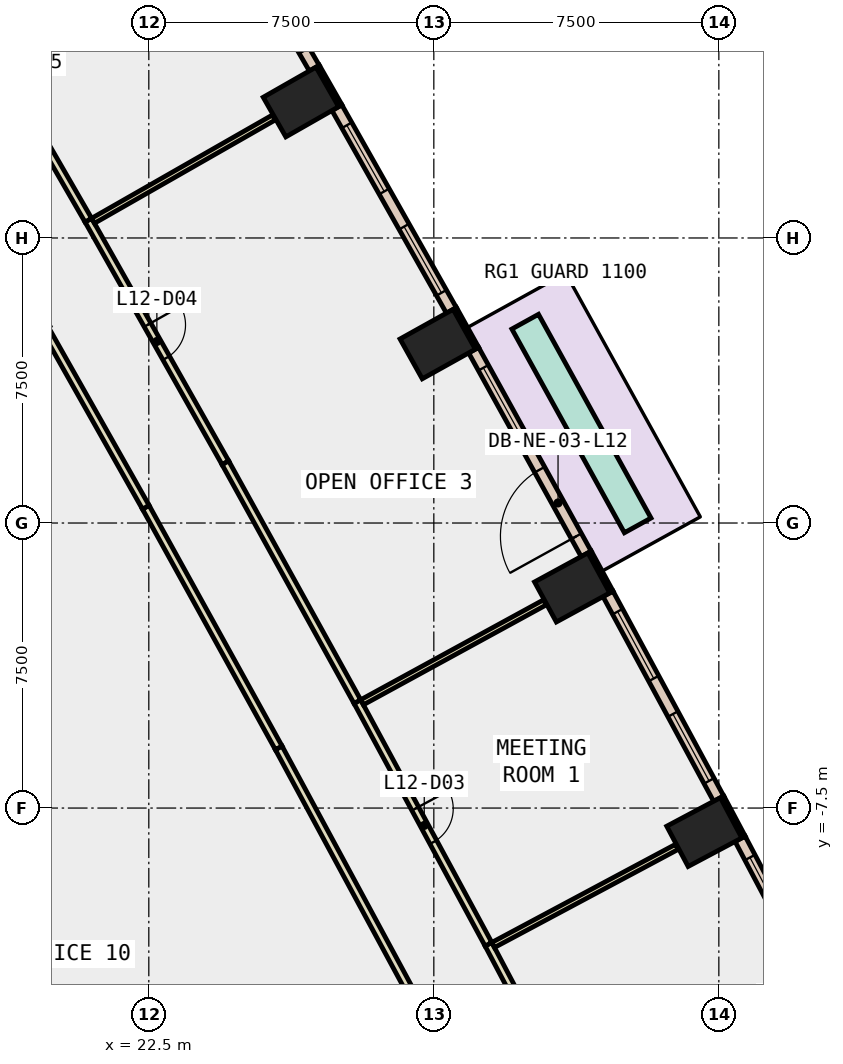
"""IFC4 building model, lengths in metres.
Left out: names, types, materials, properties, quantities, classifications, styles, units other than length and angle.
Written with IfcOpenShell. Run it as: python <this file> out.ifc"""

import sys

from ifc_helpers import new_model, si_unit, direction, frame, frame_2d, origin, origin_2d, place, context, subcontext, project, spatial, rectangle, extrude, element, fill, save


model = new_model("IFC4")
c1 = context("Model", 3, precision=1e-05, world=origin(), true_north=direction((0.0, 1.0)))
c2 = subcontext(c1, "Body", "Model", "MODEL_VIEW")
j1 = project(units=[si_unit("LENGTHUNIT", "METRE"), si_unit("PLANEANGLEUNIT", "RADIAN")], contexts=[c1])
p1 = place(None, origin())
s1 = spatial("IfcSite", under=j1, at=p1, CompositionType="ELEMENT")
p2 = place(p1, origin())
s2 = spatial("IfcBuilding", under=s1, at=p2, CompositionType="ELEMENT")
p3 = place(p2, frame((0.0, 0.0, 60.2)))
s3 = spatial("IfcBuildingStorey", under=s2, at=p3, CompositionType="ELEMENT", Elevation=60.2)
for number, where, z_axis, x_axis in (
    (1, (37.117, -8.132, -0.4), (0.0, 0.0, 1.0), (-0.469, 0.883, 0.0)),
    (2, (33.64, -1.695, -0.4), (0.0, 0.0, 1.0), (-0.478, 0.878, 0.0)),
    (3, (30.102, 4.708, -0.4), (0.0, 0.0, 1.0), (-0.487, 0.873, 0.0)),
    (4, (26.503, 11.078, -0.4), (0.0, 0.0, 1.0), (-0.496, 0.869, 0.0)),
):
    element("IfcColumn", number, at=place(p3, frame(where, z_axis=z_axis, x_axis=x_axis)), inside=s3, PredefinedType="COLUMN", context=c2, shape_type="SweptSolid", body=[
        extrude(rectangle(XDim=1.2, YDim=1.6, at=origin_2d()), origin(), (0.0, 0.0, 1.0), 4.2),
    ])
p4 = place(p3, frame((38.149, -8.263, 0.0), z_axis=(0.0, 0.0, 1.0), x_axis=(-0.469467784567, 0.882949601763, 0.0)))
e5 = element("IfcWall", 5, at=p4, inside=s3, PredefinedType="STANDARD", context=c2, shape_type="SweptSolid", body=[
    extrude(rectangle(XDim=1.199, YDim=0.1, at=frame_2d((0.6, 0.0))), origin(), (0.0, 0.0, 1.0), 3.8),
])
p5 = place(p3, frame((34.673, -1.816, 0.0), z_axis=(0.0, 0.0, 1.0), x_axis=(-0.478267644701, 0.878214131082, 0.0)))
e6 = element("IfcWall", 6, at=p5, inside=s3, PredefinedType="STANDARD", context=c2, shape_type="SweptSolid", body=[
    extrude(rectangle(XDim=1.2, YDim=0.1, at=frame_2d((0.6, 0.0))), origin(), (0.0, 0.0, 1.0), 3.8),
])
p6 = place(p3, frame((31.136, 4.598, 0.0), z_axis=(0.0, 0.0, 1.0), x_axis=(-0.486730996044, 0.87355190887, 0.0)))
e7 = element("IfcWall", 7, at=p6, inside=s3, PredefinedType="STANDARD", context=c2, shape_type="SweptSolid", body=[
    extrude(rectangle(XDim=1.2, YDim=0.1, at=frame_2d((0.6, 0.0))), origin(), (0.0, 0.0, 1.0), 3.8),
])
p7 = place(p3, frame((27.539, 10.978, 0.0), z_axis=(0.0, 0.0, 1.0), x_axis=(-0.495854054996, 0.868405870629, 0.0)))
e8 = element("IfcWall", 8, at=p7, inside=s3, PredefinedType="STANDARD", context=c2, shape_type="SweptSolid", body=[
    extrude(rectangle(XDim=1.2, YDim=0.1, at=frame_2d((0.6, 0.0))), origin(), (0.0, 0.0, 1.0), 3.8),
])
p8 = place(p3, frame((40.964, -13.81, 0.0), z_axis=(0.0, 0.0, 1.0), x_axis=(-0.467041710902, 0.884235285587, 0.0)))
e9 = element("IfcWall", 9, at=p8, inside=s3, PredefinedType="STANDARD", context=c2, shape_type="SweptSolid", body=[
    extrude(rectangle(XDim=6.22, YDim=0.3, at=frame_2d((3.11, 0.0))), origin(), (0.0, 0.0, 1.0), 3.8),
])
p9 = place(p8, frame((0.555, 0.0, 0.9)))
e10 = element("IfcOpeningElement", 10, at=p9, cuts=e9, PredefinedType="OPENING", context=c2, shape_type="SweptSolid", body=[
    extrude(rectangle(XDim=2.0, YDim=2.6, at=frame_2d((1.0, 1.3))), frame((0.0, 0.16, 0.0), z_axis=(0.0, -1.0, 0.0), x_axis=(1.0, 0.0, 0.0)), (0.0, 0.0, 1.0), 0.32),
])
p10 = place(p8, frame((3.665, 0.0, 0.9)))
e11 = element("IfcOpeningElement", 11, at=p10, cuts=e9, PredefinedType="OPENING", context=c2, shape_type="SweptSolid", body=[
    extrude(rectangle(XDim=2.0, YDim=2.6, at=frame_2d((1.0, 1.3))), frame((0.0, 0.16, 0.0), z_axis=(0.0, -1.0, 0.0), x_axis=(1.0, 0.0, 0.0)), (0.0, 0.0, 1.0), 0.32),
])
p11 = place(p3, frame((37.495, -7.253, 0.0), z_axis=(0.0, 0.0, 1.0), x_axis=(-0.475413659872, 0.879762383833, 0.0)))
e12 = element("IfcWall", 12, at=p11, inside=s3, PredefinedType="STANDARD", context=c2, shape_type="SweptSolid", body=[
    extrude(rectangle(XDim=6.125, YDim=0.3, at=frame_2d((3.063, 0.0))), origin(), (0.0, 0.0, 1.0), 3.8),
])
p12 = place(p11, frame((0.531, 0.0, 0.9)))
e13 = element("IfcOpeningElement", 13, at=p12, cuts=e12, PredefinedType="OPENING", context=c2, shape_type="SweptSolid", body=[
    extrude(rectangle(XDim=2.0, YDim=2.6, at=frame_2d((1.0, 1.3))), frame((0.0, 0.16, 0.0), z_axis=(0.0, -1.0, 0.0), x_axis=(1.0, 0.0, 0.0)), (0.0, 0.0, 1.0), 0.32),
])
p13 = place(p11, frame((3.594, 0.0, 0.9)))
e14 = element("IfcOpeningElement", 14, at=p13, cuts=e12, PredefinedType="OPENING", context=c2, shape_type="SweptSolid", body=[
    extrude(rectangle(XDim=2.0, YDim=2.6, at=frame_2d((1.0, 1.3))), frame((0.0, 0.16, 0.0), z_axis=(0.0, -1.0, 0.0), x_axis=(1.0, 0.0, 0.0)), (0.0, 0.0, 1.0), 0.32),
])
p14 = place(p3, frame((34.009, -0.812, 0.0), z_axis=(0.0, 0.0, 1.0), x_axis=(-0.483587271547, 0.875296150339, 0.0)))
e15 = element("IfcWall", 15, at=p14, inside=s3, PredefinedType="STANDARD", context=c2, shape_type="SweptSolid", body=[
    extrude(rectangle(XDim=6.125, YDim=0.3, at=frame_2d((3.062, 0.0))), origin(), (0.0, 0.0, 1.0), 3.8),
])
p15 = place(p14, frame((0.531, 0.0, 0.0)))
e16 = element("IfcOpeningElement", 16, at=p15, cuts=e15, PredefinedType="OPENING", context=c2, shape_type="SweptSolid", body=[
    extrude(rectangle(XDim=2.0, YDim=2.4, at=frame_2d((1.0, 1.2))), frame((0.0, 0.16, 0.0), z_axis=(0.0, -1.0, 0.0), x_axis=(1.0, 0.0, 0.0)), (0.0, 0.0, 1.0), 0.32),
])
p16 = place(p14, frame((3.594, 0.0, 0.9)))
e17 = element("IfcOpeningElement", 17, at=p16, cuts=e15, PredefinedType="OPENING", context=c2, shape_type="SweptSolid", body=[
    extrude(rectangle(XDim=2.0, YDim=2.6, at=frame_2d((1.0, 1.3))), frame((0.0, 0.16, 0.0), z_axis=(0.0, -1.0, 0.0), x_axis=(1.0, 0.0, 0.0)), (0.0, 0.0, 1.0), 0.32),
])
p17 = place(p3, frame((30.462, 5.595, 0.0), z_axis=(0.0, 0.0, 1.0), x_axis=(-0.491887822214, 0.870658584267, 0.0)))
e18 = element("IfcWall", 18, at=p17, inside=s3, PredefinedType="STANDARD", context=c2, shape_type="SweptSolid", body=[
    extrude(rectangle(XDim=6.125, YDim=0.3, at=frame_2d((3.062, 0.0))), origin(), (0.0, 0.0, 1.0), 3.8),
])
p18 = place(p17, frame((0.531, 0.0, 0.9)))
e19 = element("IfcOpeningElement", 19, at=p18, cuts=e18, PredefinedType="OPENING", context=c2, shape_type="SweptSolid", body=[
    extrude(rectangle(XDim=2.0, YDim=2.6, at=frame_2d((1.0, 1.3))), frame((0.0, 0.16, 0.0), z_axis=(0.0, -1.0, 0.0), x_axis=(1.0, 0.0, 0.0)), (0.0, 0.0, 1.0), 0.32),
])
p19 = place(p17, frame((3.594, 0.0, 0.9)))
e20 = element("IfcOpeningElement", 20, at=p19, cuts=e18, PredefinedType="OPENING", context=c2, shape_type="SweptSolid", body=[
    extrude(rectangle(XDim=2.0, YDim=2.6, at=frame_2d((1.0, 1.3))), frame((0.0, 0.16, 0.0), z_axis=(0.0, -1.0, 0.0), x_axis=(1.0, 0.0, 0.0)), (0.0, 0.0, 1.0), 0.32),
])
p20 = place(p3, frame((26.855, 11.968, 0.0), z_axis=(0.0, 0.0, 1.0), x_axis=(-0.499903021601, 0.86608138705, 0.0)))
e21 = element("IfcWall", 21, at=p20, inside=s3, PredefinedType="STANDARD", context=c2, shape_type="SweptSolid", body=[
    extrude(rectangle(XDim=6.125, YDim=0.3, at=frame_2d((3.062, 0.0))), origin(), (0.0, 0.0, 1.0), 3.8),
])
p21 = place(p20, frame((0.531, 0.0, 0.9)))
e22 = element("IfcOpeningElement", 22, at=p21, cuts=e21, PredefinedType="OPENING", context=c2, shape_type="SweptSolid", body=[
    extrude(rectangle(XDim=2.0, YDim=2.6, at=frame_2d((1.0, 1.3))), frame((0.0, 0.16, 0.0), z_axis=(0.0, -1.0, 0.0), x_axis=(1.0, 0.0, 0.0)), (0.0, 0.0, 1.0), 0.32),
])
p22 = place(p20, frame((3.594, 0.0, 0.9)))
e23 = element("IfcOpeningElement", 23, at=p22, cuts=e21, PredefinedType="OPENING", context=c2, shape_type="SweptSolid", body=[
    extrude(rectangle(XDim=2.0, YDim=2.6, at=frame_2d((1.0, 1.3))), frame((0.0, 0.16, 0.0), z_axis=(0.0, -1.0, 0.0), x_axis=(1.0, 0.0, 0.0)), (0.0, 0.0, 1.0), 0.32),
])
p23 = place(p3, frame((35.365, -0.063, 0.0), z_axis=(0.0, 0.0, 1.0), x_axis=(-0.48346510207, 0.875363635914, 0.0)))
e24 = element("IfcWall", 24, at=p23, inside=s3, PredefinedType="STANDARD", context=c2, shape_type="SweptSolid", body=[
    extrude(rectangle(XDim=6.125, YDim=0.8, at=frame_2d((3.062, 0.0))), origin(), (0.0, 0.0, 1.0), 0.8),
])
p24 = place(p3, frame((29.356, -12.281, 0.0), z_axis=(0.0, 0.0, 1.0), x_axis=(-0.475244544503, 0.87985375087, 0.0)))
e25 = element("IfcWall", 25, at=p24, inside=s3, PredefinedType="PARTITIONING", context=c2, shape_type="SweptSolid", body=[
    extrude(rectangle(XDim=7.234, YDim=0.2, at=frame_2d((3.617, 0.0))), origin(), (0.0, 0.0, 1.0), 3.8),
])
p25 = place(p3, frame((25.918, -5.916, 0.0), z_axis=(0.0, 0.0, 1.0), x_axis=(-0.483612623402, 0.875282143361, 0.0)))
e26 = element("IfcWall", 26, at=p25, inside=s3, PredefinedType="PARTITIONING", context=c2, shape_type="SweptSolid", body=[
    extrude(rectangle(XDim=7.233, YDim=0.2, at=frame_2d((3.617, 0.0))), origin(), (0.0, 0.0, 1.0), 3.8),
])
p26 = place(p3, frame((22.42, 0.415, 0.0), z_axis=(0.0, 0.0, 1.0), x_axis=(-0.491823859571, 0.870694717543, 0.0)))
e27 = element("IfcWall", 27, at=p26, inside=s3, PredefinedType="PARTITIONING", context=c2, shape_type="SweptSolid", body=[
    extrude(rectangle(XDim=5.309, YDim=0.2, at=frame_2d((2.654, 0.0))), origin(), (0.0, 0.0, 1.0), 3.8),
])
p27 = place(p3, frame((31.438, -11.083, 0.0), z_axis=(0.0, 0.0, 1.0), x_axis=(0.467077609314, -0.884216323575, 0.0)))
e28 = element("IfcWall", 28, at=p27, inside=s3, PredefinedType="PARTITIONING", context=c2, shape_type="SweptSolid", body=[
    extrude(rectangle(XDim=6.967, YDim=0.2, at=frame_2d((3.483, 0.0))), origin(), (0.0, 0.0, 1.0), 3.8),
])
p28 = place(p27, frame((2.983, 0.0, 0.0)))
e29 = element("IfcOpeningElement", 29, at=p28, cuts=e28, PredefinedType="OPENING", context=c2, shape_type="SweptSolid", body=[
    extrude(rectangle(XDim=1.0, YDim=2.1, at=frame_2d((0.5, 1.05))), frame((0.0, 0.11, 0.0), z_axis=(0.0, -1.0, 0.0), x_axis=(1.0, 0.0, 0.0)), (0.0, 0.0, 1.0), 0.22),
])
p29 = place(p3, frame((27.988, -4.699, 0.0), z_axis=(0.0, 0.0, 1.0), x_axis=(0.475319272717, -0.879813383044, 0.0)))
e30 = element("IfcWall", 30, at=p29, inside=s3, PredefinedType="PARTITIONING", context=c2, shape_type="SweptSolid", body=[
    extrude(rectangle(XDim=7.256, YDim=0.2, at=frame_2d((3.628, 0.0))), origin(), (0.0, 0.0, 1.0), 3.8),
])
p30 = place(p29, frame((3.203, 0.0, 0.0)))
e31 = element("IfcOpeningElement", 31, at=p30, cuts=e30, PredefinedType="OPENING", context=c2, shape_type="SweptSolid", body=[
    extrude(rectangle(XDim=1.0, YDim=2.1, at=frame_2d((0.5, 1.05))), frame((0.0, 0.11, 0.0), z_axis=(0.0, -1.0, 0.0), x_axis=(1.0, 0.0, 0.0)), (0.0, 0.0, 1.0), 0.22),
])
p31 = place(p3, frame((20.909, 7.969, 0.0), z_axis=(0.0, 0.0, 1.0), x_axis=(0.491808171064, -0.870703579225, 0.0)))
e32 = element("IfcWall", 32, at=p31, inside=s3, PredefinedType="PARTITIONING", context=c2, shape_type="SweptSolid", body=[
    extrude(rectangle(XDim=7.332, YDim=0.2, at=frame_2d((3.666, 0.0))), origin(), (0.0, 0.0, 1.0), 3.8),
])
p32 = place(p31, frame((3.166, 0.0, 0.0)))
e33 = element("IfcOpeningElement", 33, at=p32, cuts=e32, PredefinedType="OPENING", context=c2, shape_type="SweptSolid", body=[
    extrude(rectangle(XDim=1.0, YDim=2.1, at=frame_2d((0.5, 1.05))), frame((0.0, 0.11, 0.0), z_axis=(0.0, -1.0, 0.0), x_axis=(1.0, 0.0, 0.0)), (0.0, 0.0, 1.0), 0.22),
])
p33 = place(p3, frame((24.515, 1.585, 0.0), z_axis=(0.0, 0.0, 1.0), x_axis=(0.483629211989, -0.875272977597, 0.0)))
e34 = element("IfcWall", 34, at=p33, inside=s3, PredefinedType="PARTITIONING", context=c2, shape_type="SweptSolid", body=[
    extrude(rectangle(XDim=7.179, YDim=0.2, at=frame_2d((3.59, 0.0))), origin(), (0.0, 0.0, 1.0), 3.8),
])
p34 = place(p3, frame((17.318, 14.187, 0.0), z_axis=(0.0, 0.0, 1.0), x_axis=(0.499986381413, -0.866033266336, 0.0)))
e35 = element("IfcWall", 35, at=p34, inside=s3, PredefinedType="PARTITIONING", context=c2, shape_type="SweptSolid", body=[
    extrude(rectangle(XDim=7.18, YDim=0.2, at=frame_2d((3.59, 0.0))), origin(), (0.0, 0.0, 1.0), 3.8),
])
p35 = place(p34, frame((3.165, 0.0, 0.0)))
e36 = element("IfcOpeningElement", 36, at=p35, cuts=e35, PredefinedType="OPENING", context=c2, shape_type="SweptSolid", body=[
    extrude(rectangle(XDim=1.0, YDim=2.1, at=frame_2d((0.5, 1.05))), frame((0.0, 0.11, 0.0), z_axis=(0.0, -1.0, 0.0), x_axis=(1.0, 0.0, 0.0)), (0.0, 0.0, 1.0), 0.22),
])
p36 = place(p3, frame((31.561, -11.103, 0.0), z_axis=(0.0, 0.0, 1.0), x_axis=(0.882056805494, 0.47114306944, 0.0)))
e37 = element("IfcWall", 37, at=p36, inside=s3, PredefinedType="PARTITIONING", context=c2, shape_type="SweptSolid", body=[
    extrude(rectangle(XDim=5.48, YDim=0.15, at=frame_2d((2.74, 0.0))), origin(), (0.0, 0.0, 1.0), 3.8),
])
p37 = place(p3, frame((28.111, -4.717, 0.0), z_axis=(0.0, 0.0, 1.0), x_axis=(0.877558297547, 0.479469951515, 0.0)))
e38 = element("IfcWall", 38, at=p37, inside=s3, PredefinedType="PARTITIONING", context=c2, shape_type="SweptSolid", body=[
    extrude(rectangle(XDim=5.481, YDim=0.15, at=frame_2d((2.74, 0.0))), origin(), (0.0, 0.0, 1.0), 3.8),
])
p38 = place(p3, frame((21.033, 7.953, 0.0), z_axis=(0.0, 0.0, 1.0), x_axis=(0.868311678357, 0.496018980715, 0.0)))
e39 = element("IfcWall", 39, at=p38, inside=s3, PredefinedType="PARTITIONING", context=c2, shape_type="SweptSolid", body=[
    extrude(rectangle(XDim=5.48, YDim=0.15, at=frame_2d((2.74, 0.0))), origin(), (0.0, 0.0, 1.0), 3.8),
])
p39 = place(p10, origin())
e40 = element("IfcWindow", 40, at=p39, inside=s3, PartitioningType="SINGLE_PANEL", PredefinedType="WINDOW", context=c2, shape_type="SweptSolid", body=[
    extrude(rectangle(XDim=2.0, YDim=2.6, at=frame_2d((1.0, 1.3))), frame((0.0, 0.03, 0.0), z_axis=(0.0, -1.0, 0.0), x_axis=(1.0, 0.0, 0.0)), (0.0, 0.0, 1.0), 0.06),
])
fill(e11, e40)
p40 = place(p12, origin())
e41 = element("IfcWindow", 41, at=p40, inside=s3, PartitioningType="SINGLE_PANEL", PredefinedType="WINDOW", context=c2, shape_type="SweptSolid", body=[
    extrude(rectangle(XDim=2.0, YDim=2.6, at=frame_2d((1.0, 1.3))), frame((0.0, 0.03, 0.0), z_axis=(0.0, -1.0, 0.0), x_axis=(1.0, 0.0, 0.0)), (0.0, 0.0, 1.0), 0.06),
])
fill(e13, e41)
p41 = place(p13, origin())
e42 = element("IfcWindow", 42, at=p41, inside=s3, PartitioningType="SINGLE_PANEL", PredefinedType="WINDOW", context=c2, shape_type="SweptSolid", body=[
    extrude(rectangle(XDim=2.0, YDim=2.6, at=frame_2d((1.0, 1.3))), frame((0.0, 0.03, 0.0), z_axis=(0.0, -1.0, 0.0), x_axis=(1.0, 0.0, 0.0)), (0.0, 0.0, 1.0), 0.06),
])
fill(e14, e42)
p42 = place(p15, origin())
e43 = element("IfcDoor", 43, at=p42, inside=s3, OperationType="SLIDING_TO_LEFT", PredefinedType="DOOR", context=c2, shape_type="SweptSolid", body=[
    extrude(rectangle(XDim=2.0, YDim=2.4, at=frame_2d((1.0, 1.2))), frame((0.0, 0.025, 0.0), z_axis=(0.0, -1.0, 0.0), x_axis=(1.0, 0.0, 0.0)), (0.0, 0.0, 1.0), 0.05),
])
fill(e16, e43)
p43 = place(p16, origin())
e44 = element("IfcWindow", 44, at=p43, inside=s3, PartitioningType="SINGLE_PANEL", PredefinedType="WINDOW", context=c2, shape_type="SweptSolid", body=[
    extrude(rectangle(XDim=2.0, YDim=2.6, at=frame_2d((1.0, 1.3))), frame((0.0, 0.03, 0.0), z_axis=(0.0, -1.0, 0.0), x_axis=(1.0, 0.0, 0.0)), (0.0, 0.0, 1.0), 0.06),
])
fill(e17, e44)
p44 = place(p18, origin())
e45 = element("IfcWindow", 45, at=p44, inside=s3, PartitioningType="SINGLE_PANEL", PredefinedType="WINDOW", context=c2, shape_type="SweptSolid", body=[
    extrude(rectangle(XDim=2.0, YDim=2.6, at=frame_2d((1.0, 1.3))), frame((0.0, 0.03, 0.0), z_axis=(0.0, -1.0, 0.0), x_axis=(1.0, 0.0, 0.0)), (0.0, 0.0, 1.0), 0.06),
])
fill(e19, e45)
p45 = place(p19, origin())
e46 = element("IfcWindow", 46, at=p45, inside=s3, PartitioningType="SINGLE_PANEL", PredefinedType="WINDOW", context=c2, shape_type="SweptSolid", body=[
    extrude(rectangle(XDim=2.0, YDim=2.6, at=frame_2d((1.0, 1.3))), frame((0.0, 0.03, 0.0), z_axis=(0.0, -1.0, 0.0), x_axis=(1.0, 0.0, 0.0)), (0.0, 0.0, 1.0), 0.06),
])
fill(e20, e46)
p46 = place(p30, origin())
e47 = element("IfcDoor", 47, at=p46, inside=s3, OperationType="SINGLE_SWING_RIGHT", PredefinedType="DOOR", context=c2, shape_type="SweptSolid", body=[
    extrude(rectangle(XDim=1.0, YDim=2.1, at=frame_2d((0.5, 1.05))), frame((0.0, 0.025, 0.0), z_axis=(0.0, -1.0, 0.0), x_axis=(1.0, 0.0, 0.0)), (0.0, 0.0, 1.0), 0.05),
])
fill(e31, e47)
p47 = place(p32, origin())
e48 = element("IfcDoor", 48, at=p47, inside=s3, OperationType="SINGLE_SWING_RIGHT", PredefinedType="DOOR", context=c2, shape_type="SweptSolid", body=[
    extrude(rectangle(XDim=1.0, YDim=2.1, at=frame_2d((0.5, 1.05))), frame((0.0, 0.025, 0.0), z_axis=(0.0, -1.0, 0.0), x_axis=(1.0, 0.0, 0.0)), (0.0, 0.0, 1.0), 0.05),
])
fill(e33, e48)
save(model, sys.argv[1])
